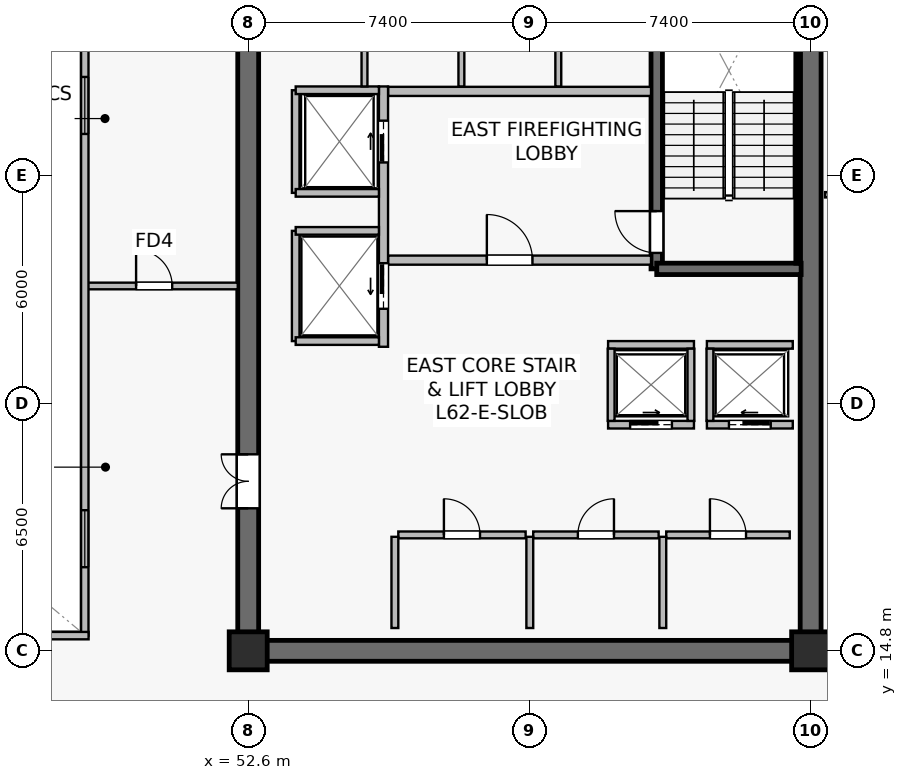
"""IFC4 building model, lengths in metres.
Left out: names, types, materials, properties, quantities, classifications, styles, units other than length and angle.
Written with IfcOpenShell. Run it as: python <this file> out.ifc"""

import sys

from ifc_helpers import new_model, si_unit, direction, frame, frame_2d, origin, origin_2d, place, context, subcontext, project, spatial, rectangle, extrude, source, transform, mapped, element, fill, save


model = new_model("IFC4")
c1 = context("Model", 3, precision=1e-05, world=origin(), true_north=direction((0.0, 1.0)))
c2 = subcontext(c1, "Body", "Model", "MODEL_VIEW")
j1 = project(units=[si_unit("LENGTHUNIT", "METRE"), si_unit("PLANEANGLEUNIT", "RADIAN")], contexts=[c1])
p1 = place(None, origin())
s1 = spatial("IfcSite", under=j1, at=p1, CompositionType="ELEMENT")
p2 = place(p1, origin())
s2 = spatial("IfcBuilding", under=s1, at=p2, CompositionType="ELEMENT")
p3 = place(p2, frame((0.0, 0.0, 258.8)))
s3 = spatial("IfcBuildingStorey", under=s2, at=p3, CompositionType="ELEMENT", Elevation=258.8)
p4 = place(p3, frame((52.325, 14.8, 0.0), z_axis=(0.0, 0.0, 1.0), x_axis=(1.0, 0.0, 0.0)))
e1 = element("IfcWall", 1, at=p4, inside=s3, PredefinedType="SHEAR", context=c2, shape_type="SweptSolid", body=[
    extrude(rectangle(XDim=15.35, YDim=0.55, at=frame_2d((7.675, 0.0))), origin(), (0.0, 0.0, 1.0), 3.8),
])
p5 = place(p3, frame((52.6, 15.075, 0.0), z_axis=(0.0, 0.0, 1.0), x_axis=(0.0, 1.0, 0.0)))
e2 = element("IfcWall", 2, at=p5, inside=s3, PredefinedType="SHEAR", context=c2, shape_type="SweptSolid", body=[
    extrude(rectangle(XDim=18.45, YDim=0.55, at=frame_2d((9.225, 0.0))), origin(), (0.0, 0.0, 1.0), 3.8),
])
p6 = place(p5, frame((3.475, 0.0, 0.0)))
e3 = element("IfcOpeningElement", 3, at=p6, cuts=e2, PredefinedType="OPENING", context=c2, shape_type="SweptSolid", body=[
    extrude(rectangle(XDim=1.42, YDim=2.2, at=frame_2d((0.71, 1.1))), frame((0.0, 0.285, 0.0), z_axis=(0.0, -1.0, 0.0), x_axis=(1.0, 0.0, 0.0)), (0.0, 0.0, 1.0), 0.57),
])
p7 = place(p3, frame((67.4, 15.075, 0.0), z_axis=(0.0, 0.0, 1.0), x_axis=(0.0, 1.0, 0.0)))
e4 = element("IfcWall", 4, at=p7, inside=s3, PredefinedType="SHEAR", context=c2, shape_type="SweptSolid", body=[
    extrude(rectangle(XDim=18.45, YDim=0.55, at=frame_2d((9.225, 0.0))), origin(), (0.0, 0.0, 1.0), 3.8),
])
p8 = place(p3, frame((63.35, 24.85, 0.0), z_axis=(0.0, 0.0, 1.0), x_axis=(0.0, 1.0, 0.0)))
e5 = element("IfcWall", 5, at=p8, inside=s3, PredefinedType="SHEAR", context=c2, shape_type="SweptSolid", body=[
    extrude(rectangle(XDim=8.63, YDim=0.3, at=frame_2d((4.315, 0.0))), origin(), (0.0, 0.0, 1.0), 3.8),
])
p9 = place(p8, frame((0.42, 0.0, 0.0)))
e6 = element("IfcOpeningElement", 6, at=p9, cuts=e5, PredefinedType="OPENING", context=c2, shape_type="SweptSolid", body=[
    extrude(rectangle(XDim=1.1, YDim=2.15, at=frame_2d((0.55, 1.075))), frame((0.0, 0.16, 0.0), z_axis=(0.0, -1.0, 0.0), x_axis=(1.0, 0.0, 0.0)), (0.0, 0.0, 1.0), 0.32),
])
p10 = place(p3, frame((63.35, 24.85, 0.0), z_axis=(0.0, 0.0, 1.0), x_axis=(1.0, 0.0, 0.0)))
e7 = element("IfcWall", 7, at=p10, inside=s3, PredefinedType="SHEAR", context=c2, shape_type="SweptSolid", body=[
    extrude(rectangle(XDim=3.8, YDim=0.3, at=frame_2d((1.9, 0.0))), origin(), (0.0, 0.0, 1.0), 3.8),
])
p11 = place(p3, frame((67.07, 25.0, 0.0), z_axis=(0.0, 0.0, 1.0), x_axis=(0.0, 1.0, 0.0)))
e8 = element("IfcWall", 8, at=p11, inside=s3, PredefinedType="SOLIDWALL", context=c2, shape_type="SweptSolid", body=[
    extrude(rectangle(XDim=8.32, YDim=0.12, at=frame_2d((4.16, 0.0))), origin(), (0.0, 0.0, 1.0), 3.8),
])
m1 = source(origin(), c2, "Body", "SweptSolid", [
    extrude(rectangle(XDim=1.0, YDim=1.0, at=origin_2d()), origin(), (0.0, 0.0, 1.0), 4.1),
])
for number, where, z_axis, x_axis in (
    (9, (52.6, 14.8, 0.0), (0.0, 0.0, 1.0), (1.0, 0.0, 0.0)),
    (10, (67.4, 14.8, 0.0), (0.0, 0.0, 1.0), (1.0, 0.0, 0.0)),
):
    element("IfcColumn", number, at=place(p3, frame(where, z_axis=z_axis, x_axis=x_axis)), inside=s3, PredefinedType="COLUMN", context=c2, shape_type="MappedRepresentation", body=[
        mapped(m1, transform((0.0, 0.0, 0.0), scale=1.0)),
    ])
p12 = place(p3, frame((56.28, 25.08, 0.0), z_axis=(0.0, 0.0, 1.0), x_axis=(1.0, 0.0, 0.0)))
e11 = element("IfcWall", 11, at=p12, inside=s3, PredefinedType="SOLIDWALL", context=c2, shape_type="SweptSolid", body=[
    extrude(rectangle(XDim=6.92, YDim=0.24, at=frame_2d((3.46, 0.0))), origin(), (0.0, 0.0, 1.0), 3.197),
])
p13 = place(p12, frame((2.6, 0.0, 0.0)))
e12 = element("IfcOpeningElement", 12, at=p13, cuts=e11, PredefinedType="OPENING", context=c2, shape_type="SweptSolid", body=[
    extrude(rectangle(XDim=1.2, YDim=2.16, at=frame_2d((0.6, 1.08))), frame((0.0, 0.13, 0.0), z_axis=(0.0, -1.0, 0.0), x_axis=(1.0, 0.0, 0.0)), (0.0, 0.0, 1.0), 0.26),
])
p14 = place(p3, frame((56.28, 29.52, 0.0), z_axis=(0.0, 0.0, 1.0), x_axis=(1.0, 0.0, 0.0)))
e13 = element("IfcWall", 13, at=p14, inside=s3, PredefinedType="SOLIDWALL", context=c2, shape_type="SweptSolid", body=[
    extrude(rectangle(XDim=6.92, YDim=0.24, at=frame_2d((3.46, 0.0))), origin(), (0.0, 0.0, 1.0), 3.197),
])
p15 = place(p3, frame((56.16, 22.8, 0.0), z_axis=(0.0, 0.0, 1.0), x_axis=(0.0, 1.0, 0.0)))
e14 = element("IfcWall", 14, at=p15, inside=s3, PredefinedType="SOLIDWALL", context=c2, shape_type="SweptSolid", body=[
    extrude(rectangle(XDim=6.85, YDim=0.24, at=frame_2d((3.425, 0.0))), origin(), (0.0, 0.0, 1.0), 2.935),
])
p16 = place(p15, frame((4.85, 0.0, 0.0)))
e15 = element("IfcOpeningElement", 15, at=p16, cuts=e14, PredefinedType="OPENING", context=c2, shape_type="SweptSolid", body=[
    extrude(rectangle(XDim=1.1, YDim=2.22, at=frame_2d((0.55, 1.11))), frame((0.0, 0.13, 0.0), z_axis=(0.0, -1.0, 0.0), x_axis=(1.0, 0.0, 0.0)), (0.0, 0.0, 1.0), 0.26),
])
p17 = place(p15, frame((1.0, 0.0, 0.0)))
e16 = element("IfcOpeningElement", 16, at=p17, cuts=e14, PredefinedType="OPENING", context=c2, shape_type="SweptSolid", body=[
    extrude(rectangle(XDim=1.2, YDim=2.22, at=frame_2d((0.6, 1.11))), frame((0.0, 0.13, 0.0), z_axis=(0.0, -1.0, 0.0), x_axis=(1.0, 0.0, 0.0)), (0.0, 0.0, 1.0), 0.26),
])
p18 = place(p3, frame((64.67, 20.75, 0.0), z_axis=(0.0, 0.0, 1.0), x_axis=(1.0, 0.0, 0.0)))
e17 = element("IfcWall", 17, at=p18, inside=s3, PredefinedType="SOLIDWALL", context=c2, shape_type="SweptSolid", body=[
    extrude(rectangle(XDim=2.26, YDim=0.2, at=frame_2d((1.13, 0.0))), origin(), (0.0, 0.0, 1.0), 3.8),
])
p19 = place(p18, frame((0.58, 0.0, 0.0)))
e18 = element("IfcOpeningElement", 18, at=p19, cuts=e17, PredefinedType="OPENING", context=c2, shape_type="SweptSolid", body=[
    extrude(rectangle(XDim=1.1, YDim=2.22, at=frame_2d((0.55, 1.11))), frame((0.0, 0.11, 0.0), z_axis=(0.0, -1.0, 0.0), x_axis=(1.0, 0.0, 0.0)), (0.0, 0.0, 1.0), 0.22),
])
p20 = place(p3, frame((64.67, 22.85, 0.0), z_axis=(0.0, 0.0, 1.0), x_axis=(1.0, 0.0, 0.0)))
e19 = element("IfcWall", 19, at=p20, inside=s3, PredefinedType="SOLIDWALL", context=c2, shape_type="SweptSolid", body=[
    extrude(rectangle(XDim=2.26, YDim=0.2, at=frame_2d((1.13, 0.0))), origin(), (0.0, 0.0, 1.0), 3.8),
])
p21 = place(p3, frame((64.75, 20.85, 0.0), z_axis=(0.0, 0.0, 1.0), x_axis=(0.0, 1.0, 0.0)))
e20 = element("IfcWall", 20, at=p21, inside=s3, PredefinedType="SOLIDWALL", context=c2, shape_type="SweptSolid", body=[
    extrude(rectangle(XDim=1.9, YDim=0.18, at=frame_2d((0.95, 0.0))), origin(), (0.0, 0.0, 1.0), 3.8),
])
p22 = place(p3, frame((62.07, 20.75, 0.0), z_axis=(0.0, 0.0, 1.0), x_axis=(1.0, 0.0, 0.0)))
e21 = element("IfcWall", 21, at=p22, inside=s3, PredefinedType="SOLIDWALL", context=c2, shape_type="SweptSolid", body=[
    extrude(rectangle(XDim=2.26, YDim=0.2, at=frame_2d((1.13, 0.0))), origin(), (0.0, 0.0, 1.0), 3.8),
])
p23 = place(p22, frame((0.58, 0.0, 0.0)))
e22 = element("IfcOpeningElement", 22, at=p23, cuts=e21, PredefinedType="OPENING", context=c2, shape_type="SweptSolid", body=[
    extrude(rectangle(XDim=1.1, YDim=2.22, at=frame_2d((0.55, 1.11))), frame((0.0, 0.11, 0.0), z_axis=(0.0, -1.0, 0.0), x_axis=(1.0, 0.0, 0.0)), (0.0, 0.0, 1.0), 0.22),
])
p24 = place(p3, frame((62.07, 22.85, 0.0), z_axis=(0.0, 0.0, 1.0), x_axis=(1.0, 0.0, 0.0)))
e23 = element("IfcWall", 23, at=p24, inside=s3, PredefinedType="SOLIDWALL", context=c2, shape_type="SweptSolid", body=[
    extrude(rectangle(XDim=2.26, YDim=0.2, at=frame_2d((1.13, 0.0))), origin(), (0.0, 0.0, 1.0), 3.8),
])
for number, where, z_axis, x_axis in (
    (24, (62.15, 20.85, 0.0), (0.0, 0.0, 1.0), (0.0, 1.0, 0.0)),
    (25, (64.25, 20.85, 0.0), (0.0, 0.0, 1.0), (0.0, 1.0, 0.0)),
):
    element("IfcWall", number, at=place(p3, frame(where, z_axis=z_axis, x_axis=x_axis)), inside=s3, PredefinedType="SOLIDWALL", context=c2, shape_type="SweptSolid", body=[
        extrude(rectangle(XDim=1.9, YDim=0.18, at=frame_2d((0.95, 0.0))), origin(), (0.0, 0.0, 1.0), 3.8),
    ])
p25 = place(p3, frame((53.85, 26.85, 0.0), z_axis=(0.0, 0.0, 1.0), x_axis=(0.0, 1.0, 0.0)))
e26 = element("IfcWall", 26, at=p25, inside=s3, PredefinedType="SOLIDWALL", context=c2, shape_type="SweptSolid", body=[
    extrude(rectangle(XDim=2.7, YDim=0.2, at=frame_2d((1.35, 0.0))), origin(), (0.0, 0.0, 1.0), 3.8),
])
p26 = place(p3, frame((53.85, 29.55, 0.0), z_axis=(0.0, 0.0, 1.0), x_axis=(1.0, 0.0, 0.0)))
e27 = element("IfcWall", 27, at=p26, inside=s3, PredefinedType="SOLIDWALL", context=c2, shape_type="SweptSolid", body=[
    extrude(rectangle(XDim=2.19, YDim=0.2, at=frame_2d((1.095, 0.0))), origin(), (0.0, 0.0, 1.0), 3.8),
])
p27 = place(p3, frame((53.85, 26.85, 0.0), z_axis=(0.0, 0.0, 1.0), x_axis=(1.0, 0.0, 0.0)))
e28 = element("IfcWall", 28, at=p27, inside=s3, PredefinedType="SOLIDWALL", context=c2, shape_type="SweptSolid", body=[
    extrude(rectangle(XDim=2.19, YDim=0.2, at=frame_2d((1.095, 0.0))), origin(), (0.0, 0.0, 1.0), 3.197),
])
p28 = place(p3, frame((53.85, 22.95, 0.0), z_axis=(0.0, 0.0, 1.0), x_axis=(0.0, 1.0, 0.0)))
e29 = element("IfcWall", 29, at=p28, inside=s3, PredefinedType="SOLIDWALL", context=c2, shape_type="SweptSolid", body=[
    extrude(rectangle(XDim=2.9, YDim=0.2, at=frame_2d((1.45, 0.0))), origin(), (0.0, 0.0, 1.0), 2.935),
])
for number, where, z_axis, x_axis in (
    (30, (53.85, 25.85, 0.0), (0.0, 0.0, 1.0), (1.0, 0.0, 0.0)),
    (31, (53.85, 22.95, 0.0), (0.0, 0.0, 1.0), (1.0, 0.0, 0.0)),
):
    element("IfcWall", number, at=place(p3, frame(where, z_axis=z_axis, x_axis=x_axis)), inside=s3, PredefinedType="SOLIDWALL", context=c2, shape_type="SweptSolid", body=[
        extrude(rectangle(XDim=2.19, YDim=0.2, at=frame_2d((1.095, 0.0))), origin(), (0.0, 0.0, 1.0), 3.8),
    ])
p29 = place(p3, frame((63.6, 17.85, 0.0), z_axis=(0.0, 0.0, 1.0), x_axis=(1.0, 0.0, 0.0)))
e32 = element("IfcWall", 32, at=p29, inside=s3, PredefinedType="SOLIDWALL", context=c2, shape_type="SweptSolid", body=[
    extrude(rectangle(XDim=3.25, YDim=0.18, at=frame_2d((1.625, 0.0))), origin(), (0.0, 0.0, 1.0), 3.8),
])
p30 = place(p29, frame((1.15, 0.0, 0.0)))
e33 = element("IfcOpeningElement", 33, at=p30, cuts=e32, PredefinedType="OPENING", context=c2, shape_type="SweptSolid", body=[
    extrude(rectangle(XDim=0.95, YDim=2.15, at=frame_2d((0.475, 1.075))), frame((0.0, 0.1, 0.0), z_axis=(0.0, -1.0, 0.0), x_axis=(1.0, 0.0, 0.0)), (0.0, 0.0, 1.0), 0.2),
])
p31 = place(p3, frame((63.51, 15.4, 0.0), z_axis=(0.0, 0.0, 1.0), x_axis=(0.0, 1.0, 0.0)))
e34 = element("IfcWall", 34, at=p31, inside=s3, PredefinedType="SOLIDWALL", context=c2, shape_type="SweptSolid", body=[
    extrude(rectangle(XDim=2.4, YDim=0.18, at=frame_2d((1.2, 0.0))), origin(), (0.0, 0.0, 1.0), 3.8),
])
p32 = place(p3, frame((60.1, 17.85, 0.0), z_axis=(0.0, 0.0, 1.0), x_axis=(1.0, 0.0, 0.0)))
e35 = element("IfcWall", 35, at=p32, inside=s3, PredefinedType="SOLIDWALL", context=c2, shape_type="SweptSolid", body=[
    extrude(rectangle(XDim=3.3, YDim=0.18, at=frame_2d((1.65, 0.0))), origin(), (0.0, 0.0, 1.0), 3.197),
])
p33 = place(p32, frame((1.175, 0.0, 0.0)))
e36 = element("IfcOpeningElement", 36, at=p33, cuts=e35, PredefinedType="OPENING", context=c2, shape_type="SweptSolid", body=[
    extrude(rectangle(XDim=0.95, YDim=2.15, at=frame_2d((0.475, 1.075))), frame((0.0, 0.1, 0.0), z_axis=(0.0, -1.0, 0.0), x_axis=(1.0, 0.0, 0.0)), (0.0, 0.0, 1.0), 0.2),
])
p34 = place(p3, frame((60.01, 15.4, 0.0), z_axis=(0.0, 0.0, 1.0), x_axis=(0.0, 1.0, 0.0)))
e37 = element("IfcWall", 37, at=p34, inside=s3, PredefinedType="SOLIDWALL", context=c2, shape_type="SweptSolid", body=[
    extrude(rectangle(XDim=2.4, YDim=0.18, at=frame_2d((1.2, 0.0))), origin(), (0.0, 0.0, 1.0), 3.197),
])
p35 = place(p3, frame((56.55, 17.85, 0.0), z_axis=(0.0, 0.0, 1.0), x_axis=(1.0, 0.0, 0.0)))
e38 = element("IfcWall", 38, at=p35, inside=s3, PredefinedType="SOLIDWALL", context=c2, shape_type="SweptSolid", body=[
    extrude(rectangle(XDim=3.35, YDim=0.18, at=frame_2d((1.675, 0.0))), origin(), (0.0, 0.0, 1.0), 3.197),
])
p36 = place(p35, frame((1.2, 0.0, 0.0)))
e39 = element("IfcOpeningElement", 39, at=p36, cuts=e38, PredefinedType="OPENING", context=c2, shape_type="SweptSolid", body=[
    extrude(rectangle(XDim=0.95, YDim=2.15, at=frame_2d((0.475, 1.075))), frame((0.0, 0.1, 0.0), z_axis=(0.0, -1.0, 0.0), x_axis=(1.0, 0.0, 0.0)), (0.0, 0.0, 1.0), 0.2),
])
p37 = place(p3, frame((56.46, 15.4, 0.0), z_axis=(0.0, 0.0, 1.0), x_axis=(0.0, 1.0, 0.0)))
e40 = element("IfcWall", 40, at=p37, inside=s3, PredefinedType="SOLIDWALL", context=c2, shape_type="SweptSolid", body=[
    extrude(rectangle(XDim=2.4, YDim=0.18, at=frame_2d((1.2, 0.0))), origin(), (0.0, 0.0, 1.0), 3.8),
])
for number, where, z_axis, x_axis in (
    (41, (60.76, 29.65, 0.0), (0.0, 0.0, 1.0), (0.0, 1.0, 0.0)),
    (42, (58.21, 29.65, 0.0), (0.0, 0.0, 1.0), (0.0, 1.0, 0.0)),
    (43, (55.66, 29.65, 0.0), (0.0, 0.0, 1.0), (0.0, 1.0, 0.0)),
):
    element("IfcWall", number, at=place(p3, frame(where, z_axis=z_axis, x_axis=x_axis)), inside=s3, PredefinedType="PLUMBINGWALL", context=c2, shape_type="SweptSolid", body=[
        extrude(rectangle(XDim=3.93, YDim=0.155, at=frame_2d((1.965, 0.0))), origin(), (0.0, 0.0, 1.0), 3.8),
    ])
p38 = place(p3, frame((48.3, 24.4, 0.0), z_axis=(0.0, 0.0, 1.0), x_axis=(1.0, 0.0, 0.0)))
e44 = element("IfcWall", 44, at=p38, inside=s3, PredefinedType="PARTITIONING", context=c2, shape_type="SweptSolid", body=[
    extrude(rectangle(XDim=4.025, YDim=0.175, at=frame_2d((2.012, 0.0))), origin(), (0.0, 0.0, 1.0), 3.8),
])
p39 = place(p38, frame((1.35, 0.0, 0.0)))
e45 = element("IfcOpeningElement", 45, at=p39, cuts=e44, PredefinedType="OPENING", context=c2, shape_type="SweptSolid", body=[
    extrude(rectangle(XDim=0.95, YDim=2.15, at=frame_2d((0.475, 1.075))), frame((0.0, 0.098, 0.0), z_axis=(0.0, -1.0, 0.0), x_axis=(1.0, 0.0, 0.0)), (0.0, 0.0, 1.0), 0.195),
])
p40 = place(p3, frame((48.3, 15.2, 0.0), z_axis=(0.0, 0.0, 1.0), x_axis=(0.0, 1.0, 0.0)))
e46 = element("IfcWall", 46, at=p40, inside=s3, PredefinedType="SOLIDWALL", context=c2, shape_type="SweptSolid", body=[
    extrude(rectangle(XDim=18.2, YDim=0.195, at=frame_2d((9.1, 0.0))), origin(), (0.0, 0.0, 1.0), 3.8),
])
p41 = place(p40, frame((1.8, 0.0, 0.9)))
e47 = element("IfcOpeningElement", 47, at=p41, cuts=e46, PredefinedType="OPENING", context=c2, shape_type="SweptSolid", body=[
    extrude(rectangle(XDim=1.5, YDim=1.4, at=frame_2d((0.75, 0.7))), frame((0.0, 0.107, 0.0), z_axis=(0.0, -1.0, 0.0), x_axis=(1.0, 0.0, 0.0)), (0.0, 0.0, 1.0), 0.215),
])
p42 = place(p40, frame((13.2, 0.0, 0.9)))
e48 = element("IfcOpeningElement", 48, at=p42, cuts=e46, PredefinedType="OPENING", context=c2, shape_type="SweptSolid", body=[
    extrude(rectangle(XDim=1.5, YDim=1.4, at=frame_2d((0.75, 0.7))), frame((0.0, 0.107, 0.0), z_axis=(0.0, -1.0, 0.0), x_axis=(1.0, 0.0, 0.0)), (0.0, 0.0, 1.0), 0.215),
])
p43 = place(p3, frame((26.4, 15.2, 0.0), z_axis=(0.0, 0.0, 1.0), x_axis=(1.0, 0.0, 0.0)))
e49 = element("IfcWall", 49, at=p43, inside=s3, PredefinedType="SOLIDWALL", context=c2, shape_type="SweptSolid", body=[
    extrude(rectangle(XDim=22.0, YDim=0.195, at=frame_2d((11.0, 0.0))), origin(), (0.0, 0.0, 1.0), 3.8),
])
p44 = place(p3, frame((67.78, 26.8, 0.0), z_axis=(0.0, 0.0, 1.0), x_axis=(1.0, 0.0, 0.0)))
e50 = element("IfcWall", 50, at=p44, inside=s3, PredefinedType="PARTITIONING", context=c2, shape_type="SweptSolid", body=[
    extrude(rectangle(XDim=2.91, YDim=0.14, at=frame_2d((1.455, 0.0))), origin(), (0.0, 0.0, 1.0), 3.8),
])
p45 = place(p3, frame((67.78, 14.505, 0.0), z_axis=(0.0, 0.0, 1.0), x_axis=(1.0, 0.0, 0.0)))
e51 = element("IfcWall", 51, at=p45, inside=s3, PredefinedType="PARTITIONING", context=c2, shape_type="SweptSolid", body=[
    extrude(rectangle(XDim=2.91, YDim=0.14, at=frame_2d((1.455, 0.0))), origin(), (0.0, 0.0, 1.0), 3.8),
])
p46 = place(p45, frame((1.005, 0.0, 0.0)))
e52 = element("IfcOpeningElement", 52, at=p46, cuts=e51, PredefinedType="OPENING", context=c2, shape_type="SweptSolid", body=[
    extrude(rectangle(XDim=0.9, YDim=2.1, at=frame_2d((0.45, 1.05))), frame((0.0, 0.08, 0.0), z_axis=(0.0, -1.0, 0.0), x_axis=(1.0, 0.0, 0.0)), (0.0, 0.0, 1.0), 0.16),
])
m2 = source(origin(), c2, "Body", "SweptSolid", [
    extrude(rectangle(XDim=1.5, YDim=1.4, at=frame_2d((0.75, 0.7))), frame((0.0, 0.03, 0.0), z_axis=(0.0, -1.0, 0.0), x_axis=(1.0, 0.0, 0.0)), (0.0, 0.0, 1.0), 0.06),
])
p47 = place(p41, origin())
e53 = element("IfcWindow", 53, at=p47, inside=s3, PartitioningType="SINGLE_PANEL", PredefinedType="WINDOW", context=c2, shape_type="MappedRepresentation", body=[
    mapped(m2, transform((0.0, 0.0, 0.0), scale=1.0)),
])
fill(e47, e53)
p48 = place(p42, origin())
e54 = element("IfcWindow", 54, at=p48, inside=s3, PartitioningType="SINGLE_PANEL", PredefinedType="WINDOW", context=c2, shape_type="MappedRepresentation", body=[
    mapped(m2, transform((0.0, 0.0, 0.0), scale=1.0)),
])
fill(e48, e54)
m3 = source(origin(), c2, "Body", "SweptSolid", [
    extrude(rectangle(XDim=1.1, YDim=2.15, at=frame_2d((0.55, 1.075))), frame((0.0, 0.025, 0.0), z_axis=(0.0, -1.0, 0.0), x_axis=(1.0, 0.0, 0.0)), (0.0, 0.0, 1.0), 0.05),
])
p49 = place(p9, origin())
e55 = element("IfcDoor", 55, at=p49, inside=s3, OperationType="SINGLE_SWING_RIGHT", PredefinedType="DOOR", context=c2, shape_type="MappedRepresentation", body=[
    mapped(m3, transform((0.0, 0.0, 0.0), scale=1.0)),
])
fill(e6, e55)
m4 = source(origin(), c2, "Body", "SweptSolid", [
    extrude(rectangle(XDim=1.2, YDim=2.16, at=frame_2d((0.6, 1.08))), frame((0.0, 0.025, 0.0), z_axis=(0.0, -1.0, 0.0), x_axis=(1.0, 0.0, 0.0)), (0.0, 0.0, 1.0), 0.05),
])
p50 = place(p13, origin())
e56 = element("IfcDoor", 56, at=p50, inside=s3, OperationType="SINGLE_SWING_LEFT", PredefinedType="DOOR", context=c2, shape_type="MappedRepresentation", body=[
    mapped(m4, transform((0.0, 0.0, 0.0), scale=1.0)),
])
fill(e12, e56)
m5 = source(origin(), c2, "Body", "SweptSolid", [
    extrude(rectangle(XDim=1.1, YDim=2.22, at=frame_2d((0.55, 1.11))), frame((0.0, 0.025, 0.0), z_axis=(0.0, -1.0, 0.0), x_axis=(1.0, 0.0, 0.0)), (0.0, 0.0, 1.0), 0.05),
])
p51 = place(p19, origin())
e57 = element("IfcDoor", 57, at=p51, inside=s3, OperationType="SLIDING_TO_LEFT", PredefinedType="USERDEFINED", context=c2, shape_type="MappedRepresentation", body=[
    mapped(m5, transform((0.0, 0.0, 0.0), scale=1.0)),
])
fill(e18, e57)
p52 = place(p23, origin())
e58 = element("IfcDoor", 58, at=p52, inside=s3, OperationType="SLIDING_TO_RIGHT", PredefinedType="USERDEFINED", context=c2, shape_type="MappedRepresentation", body=[
    mapped(m5, transform((0.0, 0.0, 0.0), scale=1.0)),
])
fill(e22, e58)
p53 = place(p16, origin())
e59 = element("IfcDoor", 59, at=p53, inside=s3, OperationType="SLIDING_TO_RIGHT", PredefinedType="USERDEFINED", context=c2, shape_type="MappedRepresentation", body=[
    mapped(m5, transform((0.0, 0.0, 0.0), scale=1.0)),
])
fill(e15, e59)
m6 = source(origin(), c2, "Body", "SweptSolid", [
    extrude(rectangle(XDim=1.2, YDim=2.22, at=frame_2d((0.6, 1.11))), frame((0.0, 0.025, 0.0), z_axis=(0.0, -1.0, 0.0), x_axis=(1.0, 0.0, 0.0)), (0.0, 0.0, 1.0), 0.05),
])
p54 = place(p17, origin())
e60 = element("IfcDoor", 60, at=p54, inside=s3, OperationType="SLIDING_TO_LEFT", PredefinedType="USERDEFINED", context=c2, shape_type="MappedRepresentation", body=[
    mapped(m6, transform((0.0, 0.0, 0.0), scale=1.0)),
])
fill(e16, e60)
m7 = source(origin(), c2, "Body", "SweptSolid", [
    extrude(rectangle(XDim=0.95, YDim=2.15, at=frame_2d((0.475, 1.075))), frame((0.0, 0.025, 0.0), z_axis=(0.0, -1.0, 0.0), x_axis=(1.0, 0.0, 0.0)), (0.0, 0.0, 1.0), 0.05),
])
p55 = place(p30, origin())
e61 = element("IfcDoor", 61, at=p55, inside=s3, OperationType="SINGLE_SWING_LEFT", PredefinedType="DOOR", context=c2, shape_type="MappedRepresentation", body=[
    mapped(m7, transform((0.0, 0.0, 0.0), scale=1.0)),
])
fill(e33, e61)
p56 = place(p33, origin())
e62 = element("IfcDoor", 62, at=p56, inside=s3, OperationType="SINGLE_SWING_RIGHT", PredefinedType="DOOR", context=c2, shape_type="MappedRepresentation", body=[
    mapped(m7, transform((0.0, 0.0, 0.0), scale=1.0)),
])
fill(e36, e62)
p57 = place(p36, origin())
e63 = element("IfcDoor", 63, at=p57, inside=s3, OperationType="SINGLE_SWING_LEFT", PredefinedType="DOOR", context=c2, shape_type="MappedRepresentation", body=[
    mapped(m7, transform((0.0, 0.0, 0.0), scale=1.0)),
])
fill(e39, e63)
m8 = source(origin(), c2, "Body", "SweptSolid", [
    extrude(rectangle(XDim=1.42, YDim=2.2, at=frame_2d((0.71, 1.1))), frame((0.0, 0.025, 0.0), z_axis=(0.0, -1.0, 0.0), x_axis=(1.0, 0.0, 0.0)), (0.0, 0.0, 1.0), 0.05),
])
p58 = place(p6, origin())
e64 = element("IfcDoor", 64, at=p58, inside=s3, OperationType="DOUBLE_DOOR_SINGLE_SWING", PredefinedType="DOOR", context=c2, shape_type="MappedRepresentation", body=[
    mapped(m8, transform((0.0, 0.0, 0.0), scale=1.0)),
])
fill(e3, e64)
p59 = place(p39, origin())
e65 = element("IfcDoor", 65, at=p59, inside=s3, OperationType="SINGLE_SWING_LEFT", PredefinedType="DOOR", context=c2, shape_type="MappedRepresentation", body=[
    mapped(m7, transform((0.0, 0.0, 0.0), scale=1.0)),
])
fill(e45, e65)
save(model, sys.argv[1])
